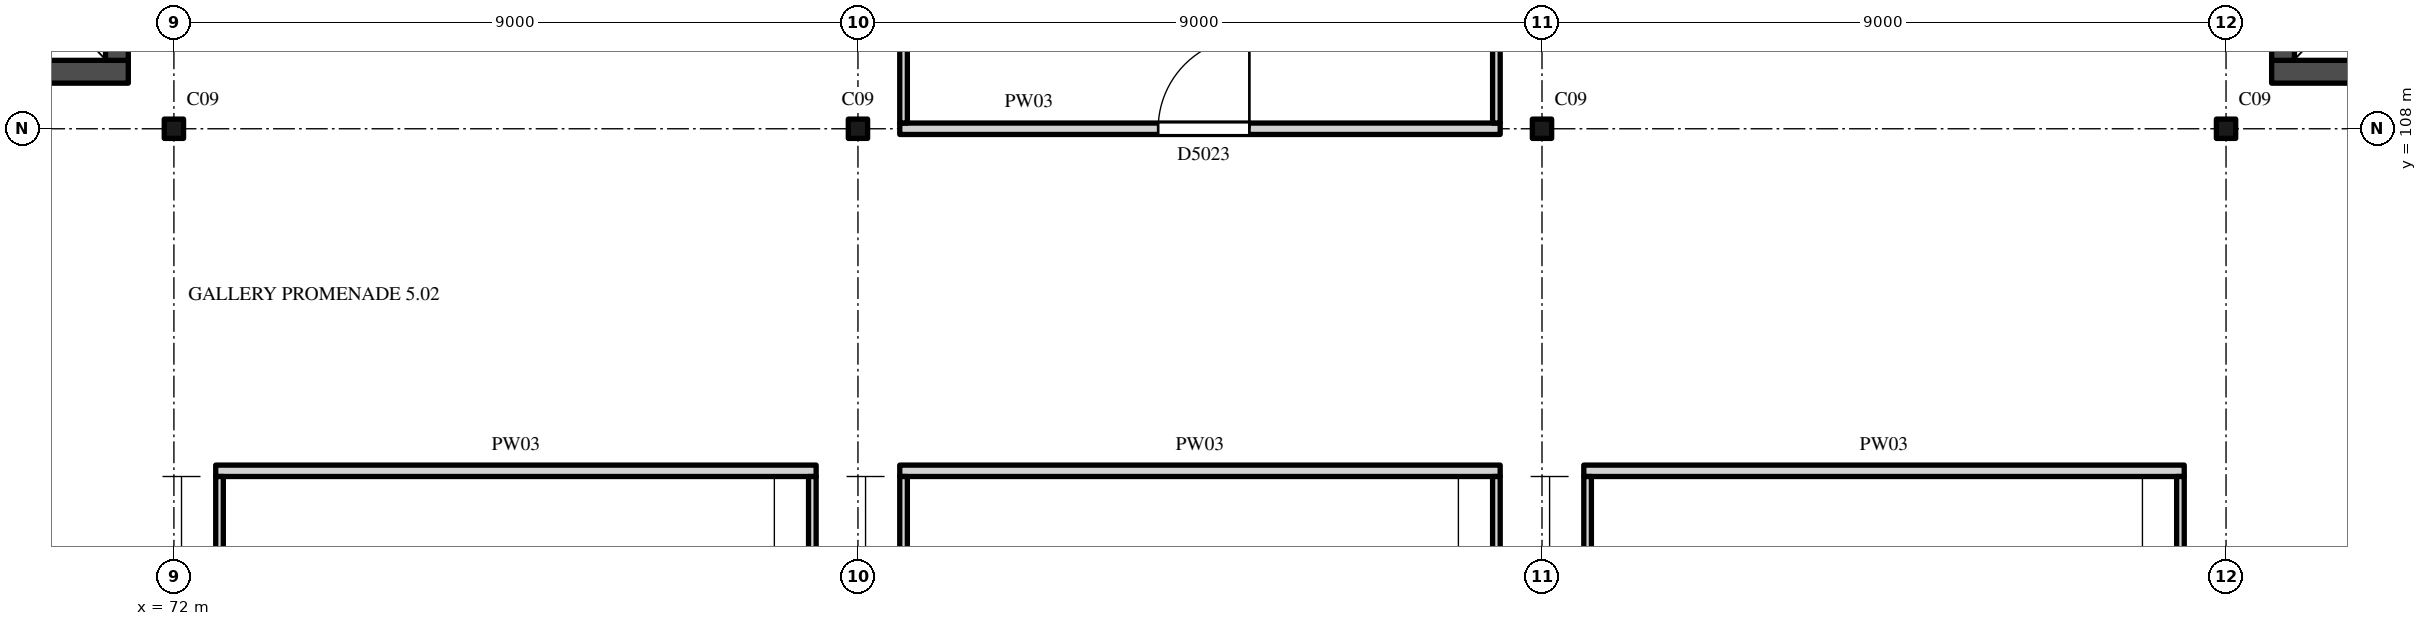
"""IFC4 building model, lengths in metres.
Left out: names, types, materials, properties, quantities, classifications, styles, units other than length and angle.
Written with IfcOpenShell. Run it as: python <this file> out.ifc"""

import sys

from ifc_helpers import new_model, si_unit, direction, frame, frame_2d, origin, origin_2d, place, context, subcontext, project, spatial, rectangle, i_section, extrude, element, fill, save


model = new_model("IFC4")
c1 = context("Model", 3, precision=1e-05, world=origin(), true_north=direction((0.0, 1.0)))
c2 = subcontext(c1, "Body", "Model", "MODEL_VIEW")
j1 = project(units=[si_unit("LENGTHUNIT", "METRE"), si_unit("PLANEANGLEUNIT", "RADIAN")], contexts=[c1])
p1 = place(None, origin())
s1 = spatial("IfcSite", under=j1, at=p1, CompositionType="ELEMENT")
p2 = place(p1, origin())
s2 = spatial("IfcBuilding", under=s1, at=p2, CompositionType="ELEMENT")
p3 = place(p2, frame((0.0, 0.0, 31.0)))
s3 = spatial("IfcBuildingStorey", under=s2, at=p3, CompositionType="ELEMENT", Elevation=31.0)
for number, where, z_axis, x_axis in (
    (1, (72.0, 108.0, 0.0), (0.0, 0.0, 1.0), (1.0, 0.0, 0.0)),
    (2, (81.0, 108.0, 0.0), (0.0, 0.0, 1.0), (1.0, 0.0, 0.0)),
    (3, (90.0, 108.0, 0.0), (0.0, 0.0, 1.0), (1.0, 0.0, 0.0)),
    (4, (99.0, 108.0, 0.0), (0.0, 0.0, 1.0), (1.0, 0.0, 0.0)),
):
    element("IfcColumn", number, at=place(p3, frame(where, z_axis=z_axis, x_axis=x_axis)), inside=s3, PredefinedType="COLUMN", context=c2, shape_type="SweptSolid", body=[
        extrude(i_section(OverallWidth=0.254, OverallDepth=0.254, WebThickness=0.009, FlangeThickness=0.014, FilletRadius=0.014, at=origin_2d()), origin(), (0.0, 0.0, 1.0), 5.0),
    ])
p4 = place(p3, frame((63.6, 108.75, 0.0), z_axis=(0.0, 0.0, 1.0), x_axis=(1.0, 0.0, 0.0)))
e5 = element("IfcWall", 5, at=p4, inside=s3, PredefinedType="SHEAR", context=c2, shape_type="SweptSolid", body=[
    extrude(rectangle(XDim=7.8, YDim=0.3, at=frame_2d((3.9, 0.0))), origin(), (0.0, 0.0, 1.0), 5.0),
])
p5 = place(p3, frame((71.25, 108.9, 0.0), z_axis=(0.0, 0.0, 1.0), x_axis=(0.0, 1.0, 0.0)))
e6 = element("IfcWall", 6, at=p5, inside=s3, PredefinedType="SHEAR", context=c2, shape_type="SweptSolid", body=[
    extrude(rectangle(XDim=7.8, YDim=0.3, at=frame_2d((3.9, 0.0))), origin(), (0.0, 0.0, 1.0), 5.0),
])
p6 = place(p5, frame((4.1, 0.0, 0.0)))
e7 = element("IfcOpeningElement", 7, at=p6, cuts=e6, PredefinedType="OPENING", context=c2, shape_type="SweptSolid", body=[
    extrude(rectangle(XDim=1.2, YDim=2.1, at=frame_2d((0.6, 1.05))), frame((0.0, 0.16, 0.0), z_axis=(0.0, -1.0, 0.0), x_axis=(1.0, 0.0, 0.0)), (0.0, 0.0, 1.0), 0.32),
])
p7 = place(p3, frame((99.6, 108.75, 0.0), z_axis=(0.0, 0.0, 1.0), x_axis=(1.0, 0.0, 0.0)))
e8 = element("IfcWall", 8, at=p7, inside=s3, PredefinedType="SHEAR", context=c2, shape_type="SweptSolid", body=[
    extrude(rectangle(XDim=7.8, YDim=0.3, at=frame_2d((3.9, 0.0))), origin(), (0.0, 0.0, 1.0), 5.0),
])
p8 = place(p3, frame((99.75, 108.9, 0.0), z_axis=(0.0, 0.0, 1.0), x_axis=(0.0, 1.0, 0.0)))
e9 = element("IfcWall", 9, at=p8, inside=s3, PredefinedType="SHEAR", context=c2, shape_type="SweptSolid", body=[
    extrude(rectangle(XDim=7.8, YDim=0.3, at=frame_2d((3.9, 0.0))), origin(), (0.0, 0.0, 1.0), 5.0),
])
p9 = place(p8, frame((4.1, 0.0, 0.0)))
e10 = element("IfcOpeningElement", 10, at=p9, cuts=e9, PredefinedType="OPENING", context=c2, shape_type="SweptSolid", body=[
    extrude(rectangle(XDim=1.2, YDim=2.1, at=frame_2d((0.6, 1.05))), frame((0.0, 0.16, 0.0), z_axis=(0.0, -1.0, 0.0), x_axis=(1.0, 0.0, 0.0)), (0.0, 0.0, 1.0), 0.32),
])
for number, where, z_axis, x_axis in (
    (11, (72.55, 103.5, 0.0), (0.0, 0.0, 1.0), (1.0, 0.0, 0.0)),
    (12, (81.55, 103.5, 0.0), (0.0, 0.0, 1.0), (1.0, 0.0, 0.0)),
    (13, (90.55, 103.5, 0.0), (0.0, 0.0, 1.0), (1.0, 0.0, 0.0)),
):
    element("IfcWall", number, at=place(p3, frame(where, z_axis=z_axis, x_axis=x_axis)), inside=s3, PredefinedType="PARTITIONING", context=c2, shape_type="SweptSolid", body=[
        extrude(rectangle(XDim=7.9, YDim=0.15, at=frame_2d((3.95, 0.0))), origin(), (0.0, 0.0, 1.0), 4.825),
    ])
p10 = place(p3, frame((81.55, 108.0, 0.0), z_axis=(0.0, 0.0, 1.0), x_axis=(1.0, 0.0, 0.0)))
e14 = element("IfcWall", 14, at=p10, inside=s3, PredefinedType="PARTITIONING", context=c2, shape_type="SweptSolid", body=[
    extrude(rectangle(XDim=7.9, YDim=0.15, at=frame_2d((3.95, 0.0))), origin(), (0.0, 0.0, 1.0), 4.518),
])
p11 = place(p10, frame((3.4, 0.0, 0.0)))
e15 = element("IfcOpeningElement", 15, at=p11, cuts=e14, PredefinedType="OPENING", context=c2, shape_type="SweptSolid", body=[
    extrude(rectangle(XDim=1.2, YDim=2.4, at=frame_2d((0.6, 1.2))), frame((0.0, 0.085, 0.0), z_axis=(0.0, -1.0, 0.0), x_axis=(1.0, 0.0, 0.0)), (0.0, 0.0, 1.0), 0.17),
])
for number, where, z_axis, x_axis in (
    (16, (72.6, 90.675, 0.0), (0.0, 0.0, 1.0), (0.0, 1.0, 0.0)),
    (17, (80.4, 90.675, 0.0), (0.0, 0.0, 1.0), (0.0, 1.0, 0.0)),
    (18, (81.6, 90.675, 0.0), (0.0, 0.0, 1.0), (0.0, 1.0, 0.0)),
):
    element("IfcWall", number, at=place(p3, frame(where, z_axis=z_axis, x_axis=x_axis)), inside=s3, PredefinedType="PARTITIONING", context=c2, shape_type="SweptSolid", body=[
        extrude(rectangle(XDim=12.75, YDim=0.1, at=frame_2d((6.375, 0.0))), origin(), (0.0, 0.0, 1.0), 4.825),
    ])
p12 = place(p3, frame((81.6, 108.075, 0.0), z_axis=(0.0, 0.0, 1.0), x_axis=(0.0, 1.0, 0.0)))
e19 = element("IfcWall", 19, at=p12, inside=s3, PredefinedType="PARTITIONING", context=c2, shape_type="SweptSolid", body=[
    extrude(rectangle(XDim=8.875, YDim=0.1, at=frame_2d((4.438, 0.0))), origin(), (0.0, 0.0, 1.0), 4.825),
])
p13 = place(p3, frame((89.4, 90.675, 0.0), z_axis=(0.0, 0.0, 1.0), x_axis=(0.0, 1.0, 0.0)))
e20 = element("IfcWall", 20, at=p13, inside=s3, PredefinedType="PARTITIONING", context=c2, shape_type="SweptSolid", body=[
    extrude(rectangle(XDim=12.75, YDim=0.1, at=frame_2d((6.375, 0.0))), origin(), (0.0, 0.0, 1.0), 4.825),
])
p14 = place(p3, frame((89.4, 108.075, 0.0), z_axis=(0.0, 0.0, 1.0), x_axis=(0.0, 1.0, 0.0)))
e21 = element("IfcWall", 21, at=p14, inside=s3, PredefinedType="PARTITIONING", context=c2, shape_type="SweptSolid", body=[
    extrude(rectangle(XDim=8.875, YDim=0.1, at=frame_2d((4.438, 0.0))), origin(), (0.0, 0.0, 1.0), 4.825),
])
for number, where, z_axis, x_axis in (
    (22, (90.6, 90.675, 0.0), (0.0, 0.0, 1.0), (0.0, 1.0, 0.0)),
    (23, (98.4, 90.675, 0.0), (0.0, 0.0, 1.0), (0.0, 1.0, 0.0)),
):
    element("IfcWall", number, at=place(p3, frame(where, z_axis=z_axis, x_axis=x_axis)), inside=s3, PredefinedType="PARTITIONING", context=c2, shape_type="SweptSolid", body=[
        extrude(rectangle(XDim=12.75, YDim=0.1, at=frame_2d((6.375, 0.0))), origin(), (0.0, 0.0, 1.0), 4.825),
    ])
p15 = place(p11, origin())
e24 = element("IfcDoor", 24, at=p15, inside=s3, OperationType="SINGLE_SWING_LEFT", PredefinedType="DOOR", context=c2, shape_type="SweptSolid", body=[
    extrude(rectangle(XDim=1.2, YDim=2.4, at=frame_2d((0.6, 1.2))), frame((0.0, 0.025, 0.0), z_axis=(0.0, -1.0, 0.0), x_axis=(1.0, 0.0, 0.0)), (0.0, 0.0, 1.0), 0.05),
])
fill(e15, e24)
save(model, sys.argv[1])
